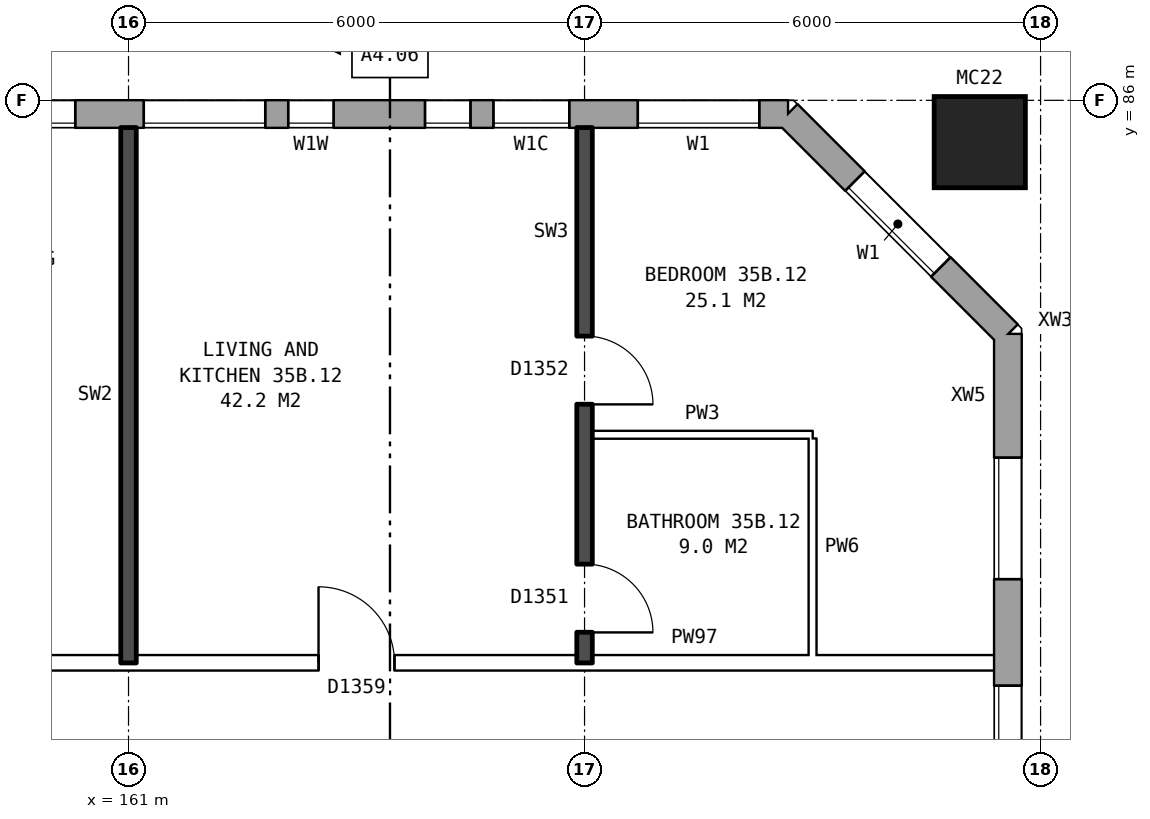
"""IFC4 building model, lengths in metres.
Left out: names, types, materials, properties, quantities, classifications, styles, units other than length and angle.
Written with IfcOpenShell. Run it as: python <this file> out.ifc"""

import sys

from ifc_helpers import new_model, si_unit, direction, frame, frame_2d, origin, origin_2d, place, context, subcontext, project, spatial, rectangle, hollow_rectangle, extrude, element, fill, save


model = new_model("IFC4")
c1 = context("Model", 3, precision=1e-05, world=origin(), true_north=direction((0.0, 1.0)))
c2 = subcontext(c1, "Body", "Model", "MODEL_VIEW")
j1 = project(units=[si_unit("LENGTHUNIT", "METRE"), si_unit("PLANEANGLEUNIT", "RADIAN")], contexts=[c1])
p1 = place(None, origin())
s1 = spatial("IfcSite", under=j1, at=p1, CompositionType="ELEMENT")
p2 = place(p1, origin())
s2 = spatial("IfcBuilding", under=s1, at=p2, CompositionType="ELEMENT")
p3 = place(p2, frame((0.0, 0.0, 126.8)))
s3 = spatial("IfcBuildingStorey", under=s2, at=p3, CompositionType="ELEMENT", Elevation=126.8)
p4 = place(p3, frame((172.2, 85.45, 0.0), z_axis=(0.0, 0.0, 1.0), x_axis=(1.0, 0.0, 0.0)))
e1 = element("IfcColumn", 1, at=p4, inside=s3, PredefinedType="COLUMN", context=c2, shape_type="SweptSolid", body=[
    extrude(hollow_rectangle(XDim=1.2, YDim=1.2, WallThickness=0.065, at=origin_2d()), origin(), (0.0, 0.0, 1.0), 3.1),
])
p5 = place(p3, frame((172.57, 57.075, 0.0), z_axis=(0.0, 0.0, 1.0), x_axis=(0.0, 1.0, 0.0)))
e2 = element("IfcWall", 2, at=p5, inside=s3, PredefinedType="STANDARD", context=c2, shape_type="SweptSolid", body=[
    extrude(rectangle(XDim=25.851, YDim=0.36, at=frame_2d((12.925, 0.0))), origin(), (0.0, 0.0, 1.0), 2.85),
])
p6 = place(p5, frame((1.625, 0.0, 0.8)))
e3 = element("IfcOpeningElement", 3, at=p6, cuts=e2, PredefinedType="OPENING", context=c2, shape_type="SweptSolid", body=[
    extrude(rectangle(XDim=1.6, YDim=1.8, at=frame_2d((0.8, 0.9))), frame((0.0, 0.19, 0.0), z_axis=(0.0, -1.0, 0.0), x_axis=(1.0, 0.0, 0.0)), (0.0, 0.0, 1.0), 0.38),
])
p7 = place(p5, frame((4.625, 0.0, 0.8)))
e4 = element("IfcOpeningElement", 4, at=p7, cuts=e2, PredefinedType="OPENING", context=c2, shape_type="SweptSolid", body=[
    extrude(rectangle(XDim=1.6, YDim=1.8, at=frame_2d((0.8, 0.9))), frame((0.0, 0.19, 0.0), z_axis=(0.0, -1.0, 0.0), x_axis=(1.0, 0.0, 0.0)), (0.0, 0.0, 1.0), 0.38),
])
p8 = place(p5, frame((6.525, 0.0, 0.8)))
e5 = element("IfcOpeningElement", 5, at=p8, cuts=e2, PredefinedType="OPENING", context=c2, shape_type="SweptSolid", body=[
    extrude(rectangle(XDim=1.2, YDim=1.8, at=frame_2d((0.6, 0.9))), frame((0.0, 0.19, 0.0), z_axis=(0.0, -1.0, 0.0), x_axis=(1.0, 0.0, 0.0)), (0.0, 0.0, 1.0), 0.38),
])
p9 = place(p5, frame((8.025, 0.0, 1.6)))
e6 = element("IfcOpeningElement", 6, at=p9, cuts=e2, PredefinedType="OPENING", context=c2, shape_type="SweptSolid", body=[
    extrude(rectangle(XDim=1.0, YDim=0.9, at=frame_2d((0.5, 0.45))), frame((0.0, 0.19, 0.0), z_axis=(0.0, -1.0, 0.0), x_axis=(1.0, 0.0, 0.0)), (0.0, 0.0, 1.0), 0.38),
])
p10 = place(p5, frame((10.075, 0.0, 0.8)))
e7 = element("IfcOpeningElement", 7, at=p10, cuts=e2, PredefinedType="OPENING", context=c2, shape_type="SweptSolid", body=[
    extrude(rectangle(XDim=1.0, YDim=0.9, at=frame_2d((0.5, 0.45))), frame((0.0, 0.19, 0.0), z_axis=(0.0, -1.0, 0.0), x_axis=(1.0, 0.0, 0.0)), (0.0, 0.0, 1.0), 0.38),
])
p11 = place(p5, frame((11.375, 0.0, 0.8)))
e8 = element("IfcOpeningElement", 8, at=p11, cuts=e2, PredefinedType="OPENING", context=c2, shape_type="SweptSolid", body=[
    extrude(rectangle(XDim=1.2, YDim=1.8, at=frame_2d((0.6, 0.9))), frame((0.0, 0.19, 0.0), z_axis=(0.0, -1.0, 0.0), x_axis=(1.0, 0.0, 0.0)), (0.0, 0.0, 1.0), 0.38),
])
p12 = place(p5, frame((19.625, 0.0, 0.8)))
e9 = element("IfcOpeningElement", 9, at=p12, cuts=e2, PredefinedType="OPENING", context=c2, shape_type="SweptSolid", body=[
    extrude(rectangle(XDim=1.6, YDim=1.8, at=frame_2d((0.8, 0.9))), frame((0.0, 0.19, 0.0), z_axis=(0.0, -1.0, 0.0), x_axis=(1.0, 0.0, 0.0)), (0.0, 0.0, 1.0), 0.38),
])
p13 = place(p5, frame((22.625, 0.0, 0.8)))
e10 = element("IfcOpeningElement", 10, at=p13, cuts=e2, PredefinedType="OPENING", context=c2, shape_type="SweptSolid", body=[
    extrude(rectangle(XDim=1.6, YDim=1.8, at=frame_2d((0.8, 0.9))), frame((0.0, 0.19, 0.0), z_axis=(0.0, -1.0, 0.0), x_axis=(1.0, 0.0, 0.0)), (0.0, 0.0, 1.0), 0.38),
])
p14 = place(p5, frame((12.875, 0.0, 0.8)))
e11 = element("IfcOpeningElement", 11, at=p14, cuts=e2, PredefinedType="OPENING", context=c2, shape_type="SweptSolid", body=[
    extrude(rectangle(XDim=1.6, YDim=1.8, at=frame_2d((0.8, 0.9))), frame((0.0, 0.19, 0.0), z_axis=(0.0, -1.0, 0.0), x_axis=(1.0, 0.0, 0.0)), (0.0, 0.0, 1.0), 0.38),
])
p15 = place(p5, frame((14.775, 0.0, 0.8)))
e12 = element("IfcOpeningElement", 12, at=p15, cuts=e2, PredefinedType="OPENING", context=c2, shape_type="SweptSolid", body=[
    extrude(rectangle(XDim=1.0, YDim=0.9, at=frame_2d((0.5, 0.45))), frame((0.0, 0.19, 0.0), z_axis=(0.0, -1.0, 0.0), x_axis=(1.0, 0.0, 0.0)), (0.0, 0.0, 1.0), 0.38),
])
p16 = place(p5, frame((16.675, 0.0, 1.7)))
e13 = element("IfcOpeningElement", 13, at=p16, cuts=e2, PredefinedType="OPENING", context=c2, shape_type="SweptSolid", body=[
    extrude(rectangle(XDim=1.0, YDim=0.9, at=frame_2d((0.5, 0.45))), frame((0.0, 0.19, 0.0), z_axis=(0.0, -1.0, 0.0), x_axis=(1.0, 0.0, 0.0)), (0.0, 0.0, 1.0), 0.38),
])
p17 = place(p5, frame((17.975, 0.0, 0.8)))
e14 = element("IfcOpeningElement", 14, at=p17, cuts=e2, PredefinedType="OPENING", context=c2, shape_type="SweptSolid", body=[
    extrude(rectangle(XDim=1.2, YDim=1.8, at=frame_2d((0.6, 0.9))), frame((0.0, 0.19, 0.0), z_axis=(0.0, -1.0, 0.0), x_axis=(1.0, 0.0, 0.0)), (0.0, 0.0, 1.0), 0.38),
])
p18 = place(p3, frame((172.57, 82.925, 0.0), z_axis=(0.0, 0.0, 1.0), x_axis=(-0.707106781187, 0.707106781187, 0.0)))
e15 = element("IfcWall", 15, at=p18, inside=s3, PredefinedType="STANDARD", context=c2, shape_type="SweptSolid", body=[
    extrude(rectangle(XDim=4.094, YDim=0.36, at=frame_2d((2.047, 0.0))), origin(), (0.0, 0.0, 1.0), 2.85),
])
p19 = place(p18, frame((1.247, 0.0, 0.8)))
e16 = element("IfcOpeningElement", 16, at=p19, cuts=e15, PredefinedType="OPENING", context=c2, shape_type="SweptSolid", body=[
    extrude(rectangle(XDim=1.6, YDim=1.8, at=frame_2d((0.8, 0.9))), frame((0.0, 0.19, 0.0), z_axis=(0.0, -1.0, 0.0), x_axis=(1.0, 0.0, 0.0)), (0.0, 0.0, 1.0), 0.38),
])
p20 = place(p3, frame((169.675, 85.82, 0.0), z_axis=(0.0, 0.0, 1.0), x_axis=(-1.0, 0.0, 0.0)))
e17 = element("IfcWall", 17, at=p20, inside=s3, PredefinedType="STANDARD", context=c2, shape_type="SweptSolid", body=[
    extrude(rectangle(XDim=35.601, YDim=0.36, at=frame_2d((17.8, 0.0))), origin(), (0.0, 0.0, 1.0), 2.85),
])
p21 = place(p20, frame((0.375, 0.0, 0.8)))
e18 = element("IfcOpeningElement", 18, at=p21, cuts=e17, PredefinedType="OPENING", context=c2, shape_type="SweptSolid", body=[
    extrude(rectangle(XDim=1.6, YDim=1.8, at=frame_2d((0.8, 0.9))), frame((0.0, 0.19, 0.0), z_axis=(0.0, -1.0, 0.0), x_axis=(1.0, 0.0, 0.0)), (0.0, 0.0, 1.0), 0.38),
])
p22 = place(p20, frame((2.875, 0.0, 0.8)))
e19 = element("IfcOpeningElement", 19, at=p22, cuts=e17, PredefinedType="OPENING", context=c2, shape_type="SweptSolid", body=[
    extrude(rectangle(XDim=1.0, YDim=1.8, at=frame_2d((0.5, 0.9))), frame((0.0, 0.19, 0.0), z_axis=(0.0, -1.0, 0.0), x_axis=(1.0, 0.0, 0.0)), (0.0, 0.0, 1.0), 0.38),
])
p23 = place(p20, frame((4.175, 0.0, 1.6)))
e20 = element("IfcOpeningElement", 20, at=p23, cuts=e17, PredefinedType="OPENING", context=c2, shape_type="SweptSolid", body=[
    extrude(rectangle(XDim=0.6, YDim=0.9, at=frame_2d((0.3, 0.45))), frame((0.0, 0.19, 0.0), z_axis=(0.0, -1.0, 0.0), x_axis=(1.0, 0.0, 0.0)), (0.0, 0.0, 1.0), 0.38),
])
p24 = place(p20, frame((9.375, 0.0, 0.8)))
e21 = element("IfcOpeningElement", 21, at=p24, cuts=e17, PredefinedType="OPENING", context=c2, shape_type="SweptSolid", body=[
    extrude(rectangle(XDim=1.6, YDim=1.8, at=frame_2d((0.8, 0.9))), frame((0.0, 0.19, 0.0), z_axis=(0.0, -1.0, 0.0), x_axis=(1.0, 0.0, 0.0)), (0.0, 0.0, 1.0), 0.38),
])
p25 = place(p20, frame((12.375, 0.0, 0.8)))
e22 = element("IfcOpeningElement", 22, at=p25, cuts=e17, PredefinedType="OPENING", context=c2, shape_type="SweptSolid", body=[
    extrude(rectangle(XDim=1.6, YDim=1.8, at=frame_2d((0.8, 0.9))), frame((0.0, 0.19, 0.0), z_axis=(0.0, -1.0, 0.0), x_axis=(1.0, 0.0, 0.0)), (0.0, 0.0, 1.0), 0.38),
])
p26 = place(p20, frame((15.375, 0.0, 0.8)))
e23 = element("IfcOpeningElement", 23, at=p26, cuts=e17, PredefinedType="OPENING", context=c2, shape_type="SweptSolid", body=[
    extrude(rectangle(XDim=1.6, YDim=1.8, at=frame_2d((0.8, 0.9))), frame((0.0, 0.19, 0.0), z_axis=(0.0, -1.0, 0.0), x_axis=(1.0, 0.0, 0.0)), (0.0, 0.0, 1.0), 0.38),
])
p27 = place(p20, frame((18.375, 0.0, 0.8)))
e24 = element("IfcOpeningElement", 24, at=p27, cuts=e17, PredefinedType="OPENING", context=c2, shape_type="SweptSolid", body=[
    extrude(rectangle(XDim=1.6, YDim=1.8, at=frame_2d((0.8, 0.9))), frame((0.0, 0.19, 0.0), z_axis=(0.0, -1.0, 0.0), x_axis=(1.0, 0.0, 0.0)), (0.0, 0.0, 1.0), 0.38),
])
p28 = place(p20, frame((21.375, 0.0, 0.8)))
e25 = element("IfcOpeningElement", 25, at=p28, cuts=e17, PredefinedType="OPENING", context=c2, shape_type="SweptSolid", body=[
    extrude(rectangle(XDim=1.6, YDim=1.8, at=frame_2d((0.8, 0.9))), frame((0.0, 0.19, 0.0), z_axis=(0.0, -1.0, 0.0), x_axis=(1.0, 0.0, 0.0)), (0.0, 0.0, 1.0), 0.38),
])
p29 = place(p20, frame((24.375, 0.0, 0.8)))
e26 = element("IfcOpeningElement", 26, at=p29, cuts=e17, PredefinedType="OPENING", context=c2, shape_type="SweptSolid", body=[
    extrude(rectangle(XDim=1.6, YDim=1.8, at=frame_2d((0.8, 0.9))), frame((0.0, 0.19, 0.0), z_axis=(0.0, -1.0, 0.0), x_axis=(1.0, 0.0, 0.0)), (0.0, 0.0, 1.0), 0.38),
])
p30 = place(p20, frame((27.375, 0.0, 0.8)))
e27 = element("IfcOpeningElement", 27, at=p30, cuts=e17, PredefinedType="OPENING", context=c2, shape_type="SweptSolid", body=[
    extrude(rectangle(XDim=1.6, YDim=1.8, at=frame_2d((0.8, 0.9))), frame((0.0, 0.19, 0.0), z_axis=(0.0, -1.0, 0.0), x_axis=(1.0, 0.0, 0.0)), (0.0, 0.0, 1.0), 0.38),
])
p31 = place(p20, frame((30.675, 0.0, 1.7)))
e28 = element("IfcOpeningElement", 28, at=p31, cuts=e17, PredefinedType="OPENING", context=c2, shape_type="SweptSolid", body=[
    extrude(rectangle(XDim=0.6, YDim=0.9, at=frame_2d((0.3, 0.45))), frame((0.0, 0.19, 0.0), z_axis=(0.0, -1.0, 0.0), x_axis=(1.0, 0.0, 0.0)), (0.0, 0.0, 1.0), 0.38),
])
p32 = place(p20, frame((33.375, 0.0, 0.8)))
e29 = element("IfcOpeningElement", 29, at=p32, cuts=e17, PredefinedType="OPENING", context=c2, shape_type="SweptSolid", body=[
    extrude(rectangle(XDim=1.6, YDim=1.8, at=frame_2d((0.8, 0.9))), frame((0.0, 0.19, 0.0), z_axis=(0.0, -1.0, 0.0), x_axis=(1.0, 0.0, 0.0)), (0.0, 0.0, 1.0), 0.38),
])
p33 = place(p20, frame((5.975, 0.0, 0.8)))
e30 = element("IfcOpeningElement", 30, at=p33, cuts=e17, PredefinedType="OPENING", context=c2, shape_type="SweptSolid", body=[
    extrude(rectangle(XDim=0.6, YDim=0.9, at=frame_2d((0.3, 0.45))), frame((0.0, 0.19, 0.0), z_axis=(0.0, -1.0, 0.0), x_axis=(1.0, 0.0, 0.0)), (0.0, 0.0, 1.0), 0.38),
])
p34 = place(p20, frame((6.875, 0.0, 0.8)))
e31 = element("IfcOpeningElement", 31, at=p34, cuts=e17, PredefinedType="OPENING", context=c2, shape_type="SweptSolid", body=[
    extrude(rectangle(XDim=1.6, YDim=1.8, at=frame_2d((0.8, 0.9))), frame((0.0, 0.19, 0.0), z_axis=(0.0, -1.0, 0.0), x_axis=(1.0, 0.0, 0.0)), (0.0, 0.0, 1.0), 0.38),
])
p35 = place(p20, frame((31.575, 0.0, 0.8)))
e32 = element("IfcOpeningElement", 32, at=p35, cuts=e17, PredefinedType="OPENING", context=c2, shape_type="SweptSolid", body=[
    extrude(rectangle(XDim=0.8, YDim=1.8, at=frame_2d((0.4, 0.9))), frame((0.0, 0.19, 0.0), z_axis=(0.0, -1.0, 0.0), x_axis=(1.0, 0.0, 0.0)), (0.0, 0.0, 1.0), 0.38),
])
p36 = place(p3, frame((155.1, 78.6, 0.0), z_axis=(0.0, 0.0, 1.0), x_axis=(1.0, 0.0, 0.0)))
e33 = element("IfcWall", 33, at=p36, inside=s3, PredefinedType="PARTITIONING", context=c2, shape_type="SweptSolid", body=[
    extrude(rectangle(XDim=17.29, YDim=0.2, at=frame_2d((8.645, 0.0))), origin(), (0.0, 0.0, 1.0), 2.85),
])
p37 = place(p36, frame((3.6, 0.0, 0.0)))
e34 = element("IfcOpeningElement", 34, at=p37, cuts=e33, PredefinedType="OPENING", context=c2, shape_type="SweptSolid", body=[
    extrude(rectangle(XDim=1.0, YDim=2.1, at=frame_2d((0.5, 1.05))), frame((0.0, 0.11, 0.0), z_axis=(0.0, -1.0, 0.0), x_axis=(1.0, 0.0, 0.0)), (0.0, 0.0, 1.0), 0.22),
])
p38 = place(p36, frame((8.4, 0.0, 0.0)))
e35 = element("IfcOpeningElement", 35, at=p38, cuts=e33, PredefinedType="OPENING", context=c2, shape_type="SweptSolid", body=[
    extrude(rectangle(XDim=1.0, YDim=2.1, at=frame_2d((0.5, 1.05))), frame((0.0, 0.11, 0.0), z_axis=(0.0, -1.0, 0.0), x_axis=(1.0, 0.0, 0.0)), (0.0, 0.0, 1.0), 0.22),
])
p39 = place(p3, frame((167.1, 81.6, 0.0), z_axis=(0.0, 0.0, 1.0), x_axis=(1.0, 0.0, 0.0)))
e36 = element("IfcWall", 36, at=p39, inside=s3, PredefinedType="PARTITIONING", context=c2, shape_type="SweptSolid", body=[
    extrude(rectangle(XDim=2.9, YDim=0.1, at=frame_2d((1.45, 0.0))), origin(), (0.0, 0.0, 1.0), 2.85),
])
p40 = place(p3, frame((161.0, 78.6, 0.0), z_axis=(0.0, 0.0, 1.0), x_axis=(0.0, 1.0, 0.0)))
e37 = element("IfcWall", 37, at=p40, inside=s3, PredefinedType="SOLIDWALL", context=c2, shape_type="SweptSolid", body=[
    extrude(rectangle(XDim=7.04, YDim=0.2, at=frame_2d((3.52, 0.0))), origin(), (0.0, 0.0, 1.0), 2.85),
])
p41 = place(p3, frame((167.0, 78.6, 0.0), z_axis=(0.0, 0.0, 1.0), x_axis=(0.0, 1.0, 0.0)))
e38 = element("IfcWall", 38, at=p41, inside=s3, PredefinedType="SOLIDWALL", context=c2, shape_type="SweptSolid", body=[
    extrude(rectangle(XDim=7.04, YDim=0.2, at=frame_2d((3.52, 0.0))), origin(), (0.0, 0.0, 1.0), 2.85),
])
p42 = place(p41, frame((3.4, 0.0, 0.0)))
e39 = element("IfcOpeningElement", 39, at=p42, cuts=e38, PredefinedType="OPENING", context=c2, shape_type="SweptSolid", body=[
    extrude(rectangle(XDim=0.9, YDim=2.1, at=frame_2d((0.45, 1.05))), frame((0.0, 0.11, 0.0), z_axis=(0.0, -1.0, 0.0), x_axis=(1.0, 0.0, 0.0)), (0.0, 0.0, 1.0), 0.22),
])
p43 = place(p41, frame((0.4, 0.0, 0.0)))
e40 = element("IfcOpeningElement", 40, at=p43, cuts=e38, PredefinedType="OPENING", context=c2, shape_type="SweptSolid", body=[
    extrude(rectangle(XDim=0.9, YDim=2.1, at=frame_2d((0.45, 1.05))), frame((0.0, 0.11, 0.0), z_axis=(0.0, -1.0, 0.0), x_axis=(1.0, 0.0, 0.0)), (0.0, 0.0, 1.0), 0.22),
])
p44 = place(p3, frame((170.0, 78.7, 0.0), z_axis=(0.0, 0.0, 1.0), x_axis=(0.0, 1.0, 0.0)))
e41 = element("IfcWall", 41, at=p44, inside=s3, PredefinedType="PARTITIONING", context=c2, shape_type="SweptSolid", body=[
    extrude(rectangle(XDim=2.85, YDim=0.1, at=frame_2d((1.425, 0.0))), origin(), (0.0, 0.0, 1.0), 2.85),
])
p45 = place(p12, origin())
e42 = element("IfcWindow", 42, at=p45, inside=s3, PartitioningType="SINGLE_PANEL", PredefinedType="WINDOW", context=c2, shape_type="SweptSolid", body=[
    extrude(rectangle(XDim=1.6, YDim=1.8, at=frame_2d((0.8, 0.9))), frame((0.0, 0.15, 0.0), z_axis=(0.0, -1.0, 0.0), x_axis=(1.0, 0.0, 0.0)), (0.0, 0.0, 1.0), 0.06),
])
fill(e9, e42)
p46 = place(p13, origin())
e43 = element("IfcWindow", 43, at=p46, inside=s3, PartitioningType="SINGLE_PANEL", PredefinedType="WINDOW", context=c2, shape_type="SweptSolid", body=[
    extrude(rectangle(XDim=1.6, YDim=1.8, at=frame_2d((0.8, 0.9))), frame((0.0, 0.15, 0.0), z_axis=(0.0, -1.0, 0.0), x_axis=(1.0, 0.0, 0.0)), (0.0, 0.0, 1.0), 0.06),
])
fill(e10, e43)
p47 = place(p19, origin())
e44 = element("IfcWindow", 44, at=p47, inside=s3, PartitioningType="SINGLE_PANEL", PredefinedType="WINDOW", context=c2, shape_type="SweptSolid", body=[
    extrude(rectangle(XDim=1.6, YDim=1.8, at=frame_2d((0.8, 0.9))), frame((0.0, 0.15, 0.0), z_axis=(0.0, -1.0, 0.0), x_axis=(1.0, 0.0, 0.0)), (0.0, 0.0, 1.0), 0.06),
])
fill(e16, e44)
p48 = place(p21, origin())
e45 = element("IfcWindow", 45, at=p48, inside=s3, PartitioningType="SINGLE_PANEL", PredefinedType="WINDOW", context=c2, shape_type="SweptSolid", body=[
    extrude(rectangle(XDim=1.6, YDim=1.8, at=frame_2d((0.8, 0.9))), frame((0.0, 0.15, 0.0), z_axis=(0.0, -1.0, 0.0), x_axis=(1.0, 0.0, 0.0)), (0.0, 0.0, 1.0), 0.06),
])
fill(e18, e45)
p49 = place(p22, origin())
e46 = element("IfcWindow", 46, at=p49, inside=s3, PartitioningType="SINGLE_PANEL", PredefinedType="WINDOW", context=c2, shape_type="SweptSolid", body=[
    extrude(rectangle(XDim=1.0, YDim=1.8, at=frame_2d((0.5, 0.9))), frame((0.0, 0.15, 0.0), z_axis=(0.0, -1.0, 0.0), x_axis=(1.0, 0.0, 0.0)), (0.0, 0.0, 1.0), 0.06),
])
fill(e19, e46)
p50 = place(p23, origin())
e47 = element("IfcWindow", 47, at=p50, inside=s3, PartitioningType="SINGLE_PANEL", PredefinedType="WINDOW", context=c2, shape_type="SweptSolid", body=[
    extrude(rectangle(XDim=0.6, YDim=0.9, at=frame_2d((0.3, 0.45))), frame((0.0, 0.15, 0.0), z_axis=(0.0, -1.0, 0.0), x_axis=(1.0, 0.0, 0.0)), (0.0, 0.0, 1.0), 0.06),
])
fill(e20, e47)
p51 = place(p24, origin())
e48 = element("IfcWindow", 48, at=p51, inside=s3, PartitioningType="SINGLE_PANEL", PredefinedType="WINDOW", context=c2, shape_type="SweptSolid", body=[
    extrude(rectangle(XDim=1.6, YDim=1.8, at=frame_2d((0.8, 0.9))), frame((0.0, 0.15, 0.0), z_axis=(0.0, -1.0, 0.0), x_axis=(1.0, 0.0, 0.0)), (0.0, 0.0, 1.0), 0.06),
])
fill(e21, e48)
p52 = place(p42, frame((0.9, 0.0, 0.0), z_axis=(0.0, 0.0, 1.0), x_axis=(-1.0, 0.0, 0.0)))
e49 = element("IfcDoor", 49, at=p52, inside=s3, OperationType="SINGLE_SWING_RIGHT", PredefinedType="DOOR", context=c2, shape_type="SweptSolid", body=[
    extrude(rectangle(XDim=0.9, YDim=2.1, at=frame_2d((0.45, 1.05))), frame((0.0, 0.025, 0.0), z_axis=(0.0, -1.0, 0.0), x_axis=(1.0, 0.0, 0.0)), (0.0, 0.0, 1.0), 0.05),
])
fill(e39, e49)
p53 = place(p38, origin())
e50 = element("IfcDoor", 50, at=p53, inside=s3, OperationType="SINGLE_SWING_LEFT", PredefinedType="DOOR", context=c2, shape_type="SweptSolid", body=[
    extrude(rectangle(XDim=1.0, YDim=2.1, at=frame_2d((0.5, 1.05))), frame((0.0, 0.025, 0.0), z_axis=(0.0, -1.0, 0.0), x_axis=(1.0, 0.0, 0.0)), (0.0, 0.0, 1.0), 0.05),
])
fill(e35, e50)
p54 = place(p43, frame((0.9, 0.0, 0.0), z_axis=(0.0, 0.0, 1.0), x_axis=(-1.0, 0.0, 0.0)))
e51 = element("IfcDoor", 51, at=p54, inside=s3, OperationType="SINGLE_SWING_RIGHT", PredefinedType="DOOR", context=c2, shape_type="SweptSolid", body=[
    extrude(rectangle(XDim=0.9, YDim=2.1, at=frame_2d((0.45, 1.05))), frame((0.0, 0.025, 0.0), z_axis=(0.0, -1.0, 0.0), x_axis=(1.0, 0.0, 0.0)), (0.0, 0.0, 1.0), 0.05),
])
fill(e40, e51)
p55 = place(p33, origin())
e52 = element("IfcWindow", 52, at=p55, inside=s3, PartitioningType="SINGLE_PANEL", PredefinedType="WINDOW", context=c2, shape_type="SweptSolid", body=[
    extrude(rectangle(XDim=0.6, YDim=0.9, at=frame_2d((0.3, 0.45))), frame((0.0, 0.15, 0.0), z_axis=(0.0, -1.0, 0.0), x_axis=(1.0, 0.0, 0.0)), (0.0, 0.0, 1.0), 0.06),
])
fill(e30, e52)
p56 = place(p34, origin())
e53 = element("IfcWindow", 53, at=p56, inside=s3, PartitioningType="SINGLE_PANEL", PredefinedType="WINDOW", context=c2, shape_type="SweptSolid", body=[
    extrude(rectangle(XDim=1.6, YDim=1.8, at=frame_2d((0.8, 0.9))), frame((0.0, 0.15, 0.0), z_axis=(0.0, -1.0, 0.0), x_axis=(1.0, 0.0, 0.0)), (0.0, 0.0, 1.0), 0.06),
])
fill(e31, e53)
save(model, sys.argv[1])
